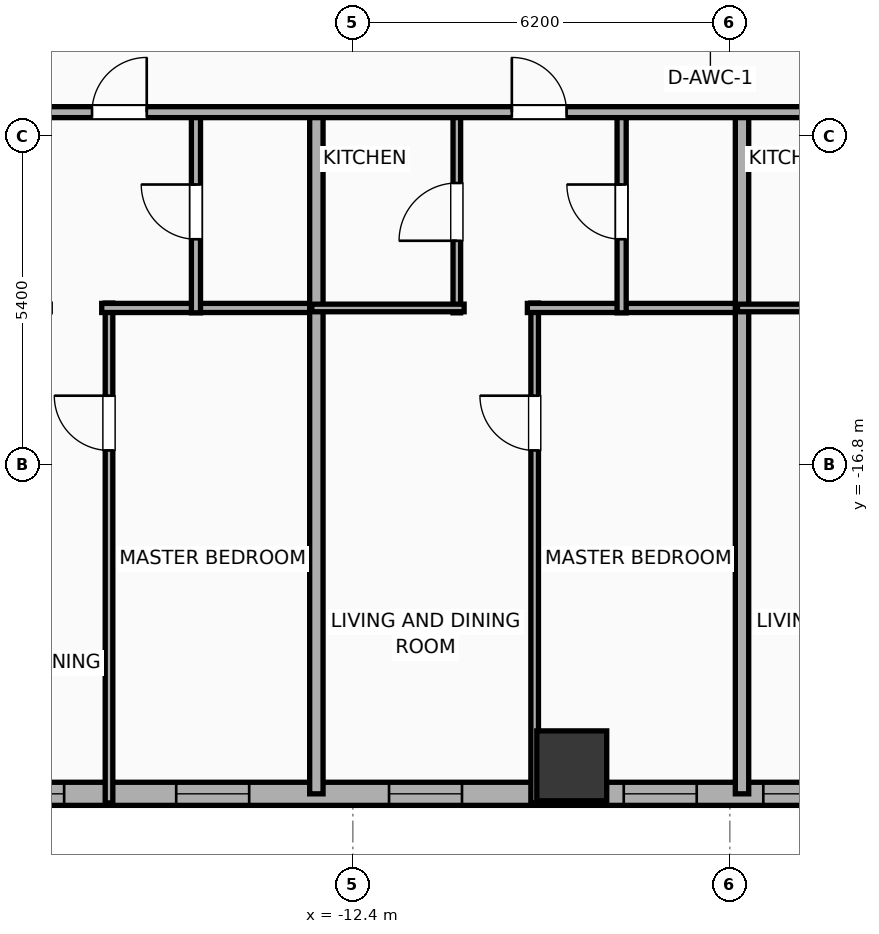
"""IFC4 building model, lengths in metres.
Left out: names, types, materials, properties, quantities, classifications, styles, units other than length and angle.
Written with IfcOpenShell. Run it as: python <this file> out.ifc"""

import sys

from ifc_helpers import new_model, si_unit, direction, frame, frame_2d, origin, origin_2d, place, context, subcontext, project, spatial, rectangle, hollow_rectangle, extrude, element, fill, save


model = new_model("IFC4")
c1 = context("Model", 3, precision=1e-05, world=origin(), true_north=direction((0.0, 1.0)))
c2 = subcontext(c1, "Body", "Model", "MODEL_VIEW")
j1 = project(units=[si_unit("LENGTHUNIT", "METRE"), si_unit("PLANEANGLEUNIT", "RADIAN")], contexts=[c1])
p1 = place(None, origin())
s1 = spatial("IfcSite", under=j1, at=p1, CompositionType="ELEMENT")
p2 = place(p1, origin())
s2 = spatial("IfcBuilding", under=s1, at=p2, CompositionType="ELEMENT")
p3 = place(p2, frame((0.0, 0.0, 65.0)))
s3 = spatial("IfcBuildingStorey", under=s2, at=p3, CompositionType="ELEMENT", Elevation=65.0)
p4 = place(p3, frame((-8.8, -21.75, 0.0), z_axis=(0.0, 0.0, 1.0), x_axis=(1.0, 0.0, 0.0)))
e1 = element("IfcColumn", 1, at=p4, inside=s3, PredefinedType="COLUMN", context=c2, shape_type="SweptSolid", body=[
    extrude(hollow_rectangle(XDim=1.15, YDim=1.15, WallThickness=0.04, at=origin_2d()), origin(), (0.0, 0.0, 1.0), 3.9),
])
p5 = place(p3, frame((22.381, -22.21, 0.0), z_axis=(0.0, 0.0, 1.0), x_axis=(-1.0, 0.0, 0.0)))
e2 = element("IfcWall", 2, at=p5, inside=s3, PredefinedType="ELEMENTEDWALL", context=c2, shape_type="SweptSolid", body=[
    extrude(rectangle(XDim=51.963, YDim=0.38, at=frame_2d((25.981, 0.0))), origin(), (0.0, 0.0, 1.0), 3.65),
])
p6 = place(p5, frame((25.631, 0.0, 0.75)))
e3 = element("IfcOpeningElement", 3, at=p6, cuts=e2, PredefinedType="OPENING", context=c2, shape_type="SweptSolid", body=[
    extrude(rectangle(XDim=2.4, YDim=2.1, at=frame_2d((1.2, 1.05))), frame((0.0, 0.2, 0.0), z_axis=(0.0, -1.0, 0.0), x_axis=(1.0, 0.0, 0.0)), (0.0, 0.0, 1.0), 0.4),
])
p7 = place(p5, frame((42.952, 0.0, 0.75)))
e4 = element("IfcOpeningElement", 4, at=p7, cuts=e2, PredefinedType="OPENING", context=c2, shape_type="SweptSolid", body=[
    extrude(rectangle(XDim=2.4, YDim=2.1, at=frame_2d((1.2, 1.05))), frame((0.0, 0.2, 0.0), z_axis=(0.0, -1.0, 0.0), x_axis=(1.0, 0.0, 0.0)), (0.0, 0.0, 1.0), 0.4),
])
p8 = place(p5, frame((49.433, 0.0, 0.75)))
e5 = element("IfcOpeningElement", 5, at=p8, cuts=e2, PredefinedType="OPENING", context=c2, shape_type="SweptSolid", body=[
    extrude(rectangle(XDim=1.2, YDim=2.05, at=frame_2d((0.6, 1.025))), frame((0.0, 0.2, 0.0), z_axis=(0.0, -1.0, 0.0), x_axis=(1.0, 0.0, 0.0)), (0.0, 0.0, 1.0), 0.4),
])
p9 = place(p5, frame((46.695, 0.0, 0.75)))
e6 = element("IfcOpeningElement", 6, at=p9, cuts=e2, PredefinedType="OPENING", context=c2, shape_type="SweptSolid", body=[
    extrude(rectangle(XDim=1.2, YDim=2.05, at=frame_2d((0.6, 1.025))), frame((0.0, 0.2, 0.0), z_axis=(0.0, -1.0, 0.0), x_axis=(1.0, 0.0, 0.0)), (0.0, 0.0, 1.0), 0.4),
])
p10 = place(p5, frame((39.529, 0.0, 0.75)))
e7 = element("IfcOpeningElement", 7, at=p10, cuts=e2, PredefinedType="OPENING", context=c2, shape_type="SweptSolid", body=[
    extrude(rectangle(XDim=1.2, YDim=2.05, at=frame_2d((0.6, 1.025))), frame((0.0, 0.2, 0.0), z_axis=(0.0, -1.0, 0.0), x_axis=(1.0, 0.0, 0.0)), (0.0, 0.0, 1.0), 0.4),
])
p11 = place(p5, frame((36.486, 0.0, 0.75)))
e8 = element("IfcOpeningElement", 8, at=p11, cuts=e2, PredefinedType="OPENING", context=c2, shape_type="SweptSolid", body=[
    extrude(rectangle(XDim=1.2, YDim=2.05, at=frame_2d((0.6, 1.025))), frame((0.0, 0.2, 0.0), z_axis=(0.0, -1.0, 0.0), x_axis=(1.0, 0.0, 0.0)), (0.0, 0.0, 1.0), 0.4),
])
p12 = place(p5, frame((32.986, 0.0, 0.75)))
e9 = element("IfcOpeningElement", 9, at=p12, cuts=e2, PredefinedType="OPENING", context=c2, shape_type="SweptSolid", body=[
    extrude(rectangle(XDim=1.2, YDim=2.05, at=frame_2d((0.6, 1.025))), frame((0.0, 0.2, 0.0), z_axis=(0.0, -1.0, 0.0), x_axis=(1.0, 0.0, 0.0)), (0.0, 0.0, 1.0), 0.4),
])
p13 = place(p5, frame((29.126, 0.0, 0.75)))
e10 = element("IfcOpeningElement", 10, at=p13, cuts=e2, PredefinedType="OPENING", context=c2, shape_type="SweptSolid", body=[
    extrude(rectangle(XDim=1.2, YDim=2.05, at=frame_2d((0.6, 1.025))), frame((0.0, 0.2, 0.0), z_axis=(0.0, -1.0, 0.0), x_axis=(1.0, 0.0, 0.0)), (0.0, 0.0, 1.0), 0.4),
])
p14 = place(p5, frame((22.486, 0.0, 0.75)))
e11 = element("IfcOpeningElement", 11, at=p14, cuts=e2, PredefinedType="OPENING", context=c2, shape_type="SweptSolid", body=[
    extrude(rectangle(XDim=1.2, YDim=2.05, at=frame_2d((0.6, 1.025))), frame((0.0, 0.2, 0.0), z_axis=(0.0, -1.0, 0.0), x_axis=(1.0, 0.0, 0.0)), (0.0, 0.0, 1.0), 0.4),
])
p15 = place(p5, frame((18.746, 0.0, 0.75)))
e12 = element("IfcOpeningElement", 12, at=p15, cuts=e2, PredefinedType="OPENING", context=c2, shape_type="SweptSolid", body=[
    extrude(rectangle(XDim=1.2, YDim=2.05, at=frame_2d((0.6, 1.025))), frame((0.0, 0.2, 0.0), z_axis=(0.0, -1.0, 0.0), x_axis=(1.0, 0.0, 0.0)), (0.0, 0.0, 1.0), 0.4),
])
p16 = place(p5, frame((15.486, 0.0, 0.75)))
e13 = element("IfcOpeningElement", 13, at=p16, cuts=e2, PredefinedType="OPENING", context=c2, shape_type="SweptSolid", body=[
    extrude(rectangle(XDim=1.2, YDim=2.05, at=frame_2d((0.6, 1.025))), frame((0.0, 0.2, 0.0), z_axis=(0.0, -1.0, 0.0), x_axis=(1.0, 0.0, 0.0)), (0.0, 0.0, 1.0), 0.4),
])
p17 = place(p5, frame((11.986, 0.0, 0.75)))
e14 = element("IfcOpeningElement", 14, at=p17, cuts=e2, PredefinedType="OPENING", context=c2, shape_type="SweptSolid", body=[
    extrude(rectangle(XDim=1.2, YDim=2.05, at=frame_2d((0.6, 1.025))), frame((0.0, 0.2, 0.0), z_axis=(0.0, -1.0, 0.0), x_axis=(1.0, 0.0, 0.0)), (0.0, 0.0, 1.0), 0.4),
])
p18 = place(p5, frame((8.366, 0.0, 0.75)))
e15 = element("IfcOpeningElement", 15, at=p18, cuts=e2, PredefinedType="OPENING", context=c2, shape_type="SweptSolid", body=[
    extrude(rectangle(XDim=1.2, YDim=2.05, at=frame_2d((0.6, 1.025))), frame((0.0, 0.2, 0.0), z_axis=(0.0, -1.0, 0.0), x_axis=(1.0, 0.0, 0.0)), (0.0, 0.0, 1.0), 0.4),
])
p19 = place(p5, frame((5.082, 0.0, 0.75)))
e16 = element("IfcOpeningElement", 16, at=p19, cuts=e2, PredefinedType="OPENING", context=c2, shape_type="SweptSolid", body=[
    extrude(rectangle(XDim=1.2, YDim=2.05, at=frame_2d((0.6, 1.025))), frame((0.0, 0.2, 0.0), z_axis=(0.0, -1.0, 0.0), x_axis=(1.0, 0.0, 0.0)), (0.0, 0.0, 1.0), 0.4),
])
p20 = place(p5, frame((2.277, 0.0, 0.75)))
e17 = element("IfcOpeningElement", 17, at=p20, cuts=e2, PredefinedType="OPENING", context=c2, shape_type="SweptSolid", body=[
    extrude(rectangle(XDim=1.2, YDim=2.05, at=frame_2d((0.6, 1.025))), frame((0.0, 0.2, 0.0), z_axis=(0.0, -1.0, 0.0), x_axis=(1.0, 0.0, 0.0)), (0.0, 0.0, 1.0), 0.4),
])
p21 = place(p5, frame((1.071, 0.0, 0.75)))
e18 = element("IfcOpeningElement", 18, at=p21, cuts=e2, PredefinedType="OPENING", context=c2, shape_type="SweptSolid", body=[
    extrude(rectangle(XDim=0.52, YDim=2.05, at=frame_2d((0.26, 1.025))), frame((0.0, 0.2, 0.0), z_axis=(0.0, -1.0, 0.0), x_axis=(1.0, 0.0, 0.0)), (0.0, 0.0, 1.0), 0.4),
])
p22 = place(p3, frame((-16.41, -22.36, 0.0), z_axis=(0.0, 0.0, 1.0), x_axis=(0.0, 1.0, 0.0)))
e19 = element("IfcWall", 19, at=p22, inside=s3, PredefinedType="PARTITIONING", context=c2, shape_type="SweptSolid", body=[
    extrude(rectangle(XDim=8.22, YDim=0.125, at=frame_2d((4.11, 0.0))), origin(), (0.0, 0.0, 1.0), 3.65),
])
p23 = place(p22, frame((5.797, 0.0, 0.0)))
e20 = element("IfcOpeningElement", 20, at=p23, cuts=e19, PredefinedType="OPENING", context=c2, shape_type="SweptSolid", body=[
    extrude(rectangle(XDim=0.9, YDim=2.05, at=frame_2d((0.45, 1.025))), frame((0.0, 0.073, 0.0), z_axis=(0.0, -1.0, 0.0), x_axis=(1.0, 0.0, 0.0)), (0.0, 0.0, 1.0), 0.145),
])
p24 = place(p3, frame((-16.53, -14.22, 0.0), z_axis=(0.0, 0.0, 1.0), x_axis=(1.0, 0.0, 0.0)))
e21 = element("IfcWall", 21, at=p24, inside=s3, PredefinedType="PLUMBINGWALL", context=c2, shape_type="SweptSolid", body=[
    extrude(rectangle(XDim=3.605, YDim=0.15, at=frame_2d((1.802, 0.0))), origin(), (0.0, 0.0, 1.0), 3.65),
])
p25 = place(p3, frame((-14.98, -14.3, 0.0), z_axis=(0.0, 0.0, 1.0), x_axis=(0.0, 1.0, 0.0)))
e22 = element("IfcWall", 22, at=p25, inside=s3, PredefinedType="PLUMBINGWALL", context=c2, shape_type="SweptSolid", body=[
    extrude(rectangle(XDim=3.32, YDim=0.15, at=frame_2d((1.66, 0.0))), origin(), (0.0, 0.0, 1.0), 3.65),
])
p26 = place(p25, frame((1.21, 0.0, 0.0)))
e23 = element("IfcOpeningElement", 23, at=p26, cuts=e22, PredefinedType="OPENING", context=c2, shape_type="SweptSolid", body=[
    extrude(rectangle(XDim=0.9, YDim=2.05, at=frame_2d((0.45, 1.025))), frame((0.0, 0.085, 0.0), z_axis=(0.0, -1.0, 0.0), x_axis=(1.0, 0.0, 0.0)), (0.0, 0.0, 1.0), 0.17),
])
p27 = place(p3, frame((-13.0, -22.21, 0.0), z_axis=(0.0, 0.0, 1.0), x_axis=(0.0, 1.0, 0.0)))
e24 = element("IfcWall", 24, at=p27, inside=s3, PredefinedType="PARTITIONING", context=c2, shape_type="SweptSolid", body=[
    extrude(rectangle(XDim=11.29, YDim=0.22, at=frame_2d((5.645, 0.0))), origin(), (0.0, 0.0, 1.0), 3.65),
])
p28 = place(p3, frame((-9.41, -22.36, 0.0), z_axis=(0.0, 0.0, 1.0), x_axis=(0.0, 1.0, 0.0)))
e25 = element("IfcWall", 25, at=p28, inside=s3, PredefinedType="PARTITIONING", context=c2, shape_type="SweptSolid", body=[
    extrude(rectangle(XDim=8.22, YDim=0.125, at=frame_2d((4.11, 0.0))), origin(), (0.0, 0.0, 1.0), 2.94),
])
p29 = place(p28, frame((5.797, 0.0, 0.0)))
e26 = element("IfcOpeningElement", 26, at=p29, cuts=e25, PredefinedType="OPENING", context=c2, shape_type="SweptSolid", body=[
    extrude(rectangle(XDim=0.9, YDim=2.05, at=frame_2d((0.45, 1.025))), frame((0.0, 0.073, 0.0), z_axis=(0.0, -1.0, 0.0), x_axis=(1.0, 0.0, 0.0)), (0.0, 0.0, 1.0), 0.145),
])
p30 = place(p3, frame((-9.53, -14.22, 0.0), z_axis=(0.0, 0.0, 1.0), x_axis=(1.0, 0.0, 0.0)))
e27 = element("IfcWall", 27, at=p30, inside=s3, PredefinedType="PLUMBINGWALL", context=c2, shape_type="SweptSolid", body=[
    extrude(rectangle(XDim=3.605, YDim=0.15, at=frame_2d((1.802, 0.0))), origin(), (0.0, 0.0, 1.0), 3.65),
])
p31 = place(p3, frame((-10.69, -14.3, 0.0), z_axis=(0.0, 0.0, 1.0), x_axis=(0.0, 1.0, 0.0)))
e28 = element("IfcWall", 28, at=p31, inside=s3, PredefinedType="PARTITIONING", context=c2, shape_type="SweptSolid", body=[
    extrude(rectangle(XDim=3.32, YDim=0.125, at=frame_2d((1.66, 0.0))), origin(), (0.0, 0.0, 1.0), 2.94),
])
p32 = place(p31, frame((1.185, 0.0, 0.0)))
e29 = element("IfcOpeningElement", 29, at=p32, cuts=e28, PredefinedType="OPENING", context=c2, shape_type="SweptSolid", body=[
    extrude(rectangle(XDim=0.95, YDim=2.05, at=frame_2d((0.475, 1.025))), frame((0.0, 0.073, 0.0), z_axis=(0.0, -1.0, 0.0), x_axis=(1.0, 0.0, 0.0)), (0.0, 0.0, 1.0), 0.145),
])
p33 = place(p3, frame((-13.075, -14.22, 0.0), z_axis=(0.0, 0.0, 1.0), x_axis=(1.0, 0.0, 0.0)))
e30 = element("IfcWall", 30, at=p33, inside=s3, PredefinedType="PARTITIONING", context=c2, shape_type="SweptSolid", body=[
    extrude(rectangle(XDim=2.505, YDim=0.125, at=frame_2d((1.252, 0.0))), origin(), (0.0, 0.0, 1.0), 3.65),
])
p34 = place(p3, frame((-7.98, -14.3, 0.0), z_axis=(0.0, 0.0, 1.0), x_axis=(0.0, 1.0, 0.0)))
e31 = element("IfcWall", 31, at=p34, inside=s3, PredefinedType="PLUMBINGWALL", context=c2, shape_type="SweptSolid", body=[
    extrude(rectangle(XDim=3.32, YDim=0.15, at=frame_2d((1.66, 0.0))), origin(), (0.0, 0.0, 1.0), 3.65),
])
p35 = place(p34, frame((1.21, 0.0, 0.0)))
e32 = element("IfcOpeningElement", 32, at=p35, cuts=e31, PredefinedType="OPENING", context=c2, shape_type="SweptSolid", body=[
    extrude(rectangle(XDim=0.9, YDim=2.05, at=frame_2d((0.45, 1.025))), frame((0.0, 0.085, 0.0), z_axis=(0.0, -1.0, 0.0), x_axis=(1.0, 0.0, 0.0)), (0.0, 0.0, 1.0), 0.17),
])
p36 = place(p3, frame((-6.0, -22.21, 0.0), z_axis=(0.0, 0.0, 1.0), x_axis=(0.0, 1.0, 0.0)))
e33 = element("IfcWall", 33, at=p36, inside=s3, PredefinedType="PARTITIONING", context=c2, shape_type="SweptSolid", body=[
    extrude(rectangle(XDim=11.29, YDim=0.22, at=frame_2d((5.645, 0.0))), origin(), (0.0, 0.0, 1.0), 3.65),
])
p37 = place(p3, frame((-6.075, -14.22, 0.0), z_axis=(0.0, 0.0, 1.0), x_axis=(1.0, 0.0, 0.0)))
e34 = element("IfcWall", 34, at=p37, inside=s3, PredefinedType="PARTITIONING", context=c2, shape_type="SweptSolid", body=[
    extrude(rectangle(XDim=2.505, YDim=0.125, at=frame_2d((1.252, 0.0))), origin(), (0.0, 0.0, 1.0), 3.65),
])
p38 = place(p3, frame((-33.41, -11.0, 0.0), z_axis=(0.0, 0.0, 1.0), x_axis=(1.0, 0.0, 0.0)))
e35 = element("IfcWall", 35, at=p38, inside=s3, PredefinedType="PARTITIONING", context=c2, shape_type="SweptSolid", body=[
    extrude(rectangle(XDim=59.62, YDim=0.18, at=frame_2d((29.81, 0.0))), origin(), (0.0, 0.0, 1.0), 3.65),
])
p39 = place(p38, frame((3.08, 0.0, 0.0)))
e36 = element("IfcOpeningElement", 36, at=p39, cuts=e35, PredefinedType="OPENING", context=c2, shape_type="SweptSolid", body=[
    extrude(rectangle(XDim=0.9, YDim=2.05, at=frame_2d((0.45, 1.025))), frame((0.0, 0.1, 0.0), z_axis=(0.0, -1.0, 0.0), x_axis=(1.0, 0.0, 0.0)), (0.0, 0.0, 1.0), 0.2),
])
p40 = place(p38, frame((9.918, 0.0, 0.0)))
e37 = element("IfcOpeningElement", 37, at=p40, cuts=e35, PredefinedType="OPENING", context=c2, shape_type="SweptSolid", body=[
    extrude(rectangle(XDim=0.9, YDim=2.05, at=frame_2d((0.45, 1.025))), frame((0.0, 0.1, 0.0), z_axis=(0.0, -1.0, 0.0), x_axis=(1.0, 0.0, 0.0)), (0.0, 0.0, 1.0), 0.2),
])
p41 = place(p38, frame((16.721, 0.0, 0.0)))
e38 = element("IfcOpeningElement", 38, at=p41, cuts=e35, PredefinedType="OPENING", context=c2, shape_type="SweptSolid", body=[
    extrude(rectangle(XDim=0.9, YDim=2.05, at=frame_2d((0.45, 1.025))), frame((0.0, 0.1, 0.0), z_axis=(0.0, -1.0, 0.0), x_axis=(1.0, 0.0, 0.0)), (0.0, 0.0, 1.0), 0.2),
])
p42 = place(p38, frame((23.625, 0.0, 0.0)))
e39 = element("IfcOpeningElement", 39, at=p42, cuts=e35, PredefinedType="OPENING", context=c2, shape_type="SweptSolid", body=[
    extrude(rectangle(XDim=0.9, YDim=2.05, at=frame_2d((0.45, 1.025))), frame((0.0, 0.1, 0.0), z_axis=(0.0, -1.0, 0.0), x_axis=(1.0, 0.0, 0.0)), (0.0, 0.0, 1.0), 0.2),
])
p43 = place(p38, frame((30.624, 0.0, 0.0)))
e40 = element("IfcOpeningElement", 40, at=p43, cuts=e35, PredefinedType="OPENING", context=c2, shape_type="SweptSolid", body=[
    extrude(rectangle(XDim=0.9, YDim=2.05, at=frame_2d((0.45, 1.025))), frame((0.0, 0.1, 0.0), z_axis=(0.0, -1.0, 0.0), x_axis=(1.0, 0.0, 0.0)), (0.0, 0.0, 1.0), 0.2),
])
p44 = place(p38, frame((37.623, 0.0, 0.0)))
e41 = element("IfcOpeningElement", 41, at=p44, cuts=e35, PredefinedType="OPENING", context=c2, shape_type="SweptSolid", body=[
    extrude(rectangle(XDim=0.9, YDim=2.05, at=frame_2d((0.45, 1.025))), frame((0.0, 0.1, 0.0), z_axis=(0.0, -1.0, 0.0), x_axis=(1.0, 0.0, 0.0)), (0.0, 0.0, 1.0), 0.2),
])
p45 = place(p38, frame((44.623, 0.0, 0.0)))
e42 = element("IfcOpeningElement", 42, at=p45, cuts=e35, PredefinedType="OPENING", context=c2, shape_type="SweptSolid", body=[
    extrude(rectangle(XDim=0.9, YDim=2.05, at=frame_2d((0.45, 1.025))), frame((0.0, 0.1, 0.0), z_axis=(0.0, -1.0, 0.0), x_axis=(1.0, 0.0, 0.0)), (0.0, 0.0, 1.0), 0.2),
])
p46 = place(p38, frame((49.565, 0.0, 0.0)))
e43 = element("IfcOpeningElement", 43, at=p46, cuts=e35, PredefinedType="OPENING", context=c2, shape_type="SweptSolid", body=[
    extrude(rectangle(XDim=1.15, YDim=2.05, at=frame_2d((0.575, 1.025))), frame((0.0, 0.1, 0.0), z_axis=(0.0, -1.0, 0.0), x_axis=(1.0, 0.0, 0.0)), (0.0, 0.0, 1.0), 0.2),
])
p47 = place(p38, frame((56.583, 0.0, 0.0)))
e44 = element("IfcOpeningElement", 44, at=p47, cuts=e35, PredefinedType="OPENING", context=c2, shape_type="SweptSolid", body=[
    extrude(rectangle(XDim=0.9, YDim=2.05, at=frame_2d((0.45, 1.025))), frame((0.0, 0.1, 0.0), z_axis=(0.0, -1.0, 0.0), x_axis=(1.0, 0.0, 0.0)), (0.0, 0.0, 1.0), 0.2),
])
p48 = place(p6, origin())
e45 = element("IfcWindow", 45, at=p48, inside=s3, PartitioningType="SINGLE_PANEL", PredefinedType="WINDOW", context=c2, shape_type="SweptSolid", body=[
    extrude(rectangle(XDim=2.4, YDim=2.1, at=frame_2d((1.2, 1.05))), frame((0.0, 0.03, 0.0), z_axis=(0.0, -1.0, 0.0), x_axis=(1.0, 0.0, 0.0)), (0.0, 0.0, 1.0), 0.06),
])
fill(e3, e45)
p49 = place(p10, origin())
e46 = element("IfcWindow", 46, at=p49, inside=s3, PartitioningType="SINGLE_PANEL", PredefinedType="WINDOW", context=c2, shape_type="SweptSolid", body=[
    extrude(rectangle(XDim=1.2, YDim=2.05, at=frame_2d((0.6, 1.025))), frame((0.0, 0.03, 0.0), z_axis=(0.0, -1.0, 0.0), x_axis=(1.0, 0.0, 0.0)), (0.0, 0.0, 1.0), 0.06),
])
fill(e7, e46)
p50 = place(p11, origin())
e47 = element("IfcWindow", 47, at=p50, inside=s3, PartitioningType="SINGLE_PANEL", PredefinedType="WINDOW", context=c2, shape_type="SweptSolid", body=[
    extrude(rectangle(XDim=1.2, YDim=2.05, at=frame_2d((0.6, 1.025))), frame((0.0, 0.03, 0.0), z_axis=(0.0, -1.0, 0.0), x_axis=(1.0, 0.0, 0.0)), (0.0, 0.0, 1.0), 0.06),
])
fill(e8, e47)
p51 = place(p12, origin())
e48 = element("IfcWindow", 48, at=p51, inside=s3, PartitioningType="SINGLE_PANEL", PredefinedType="WINDOW", context=c2, shape_type="SweptSolid", body=[
    extrude(rectangle(XDim=1.2, YDim=2.05, at=frame_2d((0.6, 1.025))), frame((0.0, 0.03, 0.0), z_axis=(0.0, -1.0, 0.0), x_axis=(1.0, 0.0, 0.0)), (0.0, 0.0, 1.0), 0.06),
])
fill(e9, e48)
p52 = place(p13, origin())
e49 = element("IfcWindow", 49, at=p52, inside=s3, PartitioningType="SINGLE_PANEL", PredefinedType="WINDOW", context=c2, shape_type="SweptSolid", body=[
    extrude(rectangle(XDim=1.2, YDim=2.05, at=frame_2d((0.6, 1.025))), frame((0.0, 0.03, 0.0), z_axis=(0.0, -1.0, 0.0), x_axis=(1.0, 0.0, 0.0)), (0.0, 0.0, 1.0), 0.06),
])
fill(e10, e49)
p53 = place(p23, origin())
e50 = element("IfcDoor", 50, at=p53, inside=s3, OperationType="SINGLE_SWING_RIGHT", PredefinedType="DOOR", context=c2, shape_type="SweptSolid", body=[
    extrude(rectangle(XDim=0.9, YDim=2.05, at=frame_2d((0.45, 1.025))), frame((0.0, 0.025, 0.0), z_axis=(0.0, -1.0, 0.0), x_axis=(1.0, 0.0, 0.0)), (0.0, 0.0, 1.0), 0.05),
])
fill(e20, e50)
p54 = place(p26, origin())
e51 = element("IfcDoor", 51, at=p54, inside=s3, OperationType="SINGLE_SWING_RIGHT", PredefinedType="DOOR", context=c2, shape_type="SweptSolid", body=[
    extrude(rectangle(XDim=0.9, YDim=2.05, at=frame_2d((0.45, 1.025))), frame((0.0, 0.025, 0.0), z_axis=(0.0, -1.0, 0.0), x_axis=(1.0, 0.0, 0.0)), (0.0, 0.0, 1.0), 0.05),
])
fill(e23, e51)
p55 = place(p29, origin())
e52 = element("IfcDoor", 52, at=p55, inside=s3, OperationType="SINGLE_SWING_RIGHT", PredefinedType="DOOR", context=c2, shape_type="SweptSolid", body=[
    extrude(rectangle(XDim=0.9, YDim=2.05, at=frame_2d((0.45, 1.025))), frame((0.0, 0.025, 0.0), z_axis=(0.0, -1.0, 0.0), x_axis=(1.0, 0.0, 0.0)), (0.0, 0.0, 1.0), 0.05),
])
fill(e26, e52)
p56 = place(p32, origin())
e53 = element("IfcDoor", 53, at=p56, inside=s3, OperationType="SINGLE_SWING_LEFT", PredefinedType="DOOR", context=c2, shape_type="SweptSolid", body=[
    extrude(rectangle(XDim=0.95, YDim=2.05, at=frame_2d((0.475, 1.025))), frame((0.0, 0.025, 0.0), z_axis=(0.0, -1.0, 0.0), x_axis=(1.0, 0.0, 0.0)), (0.0, 0.0, 1.0), 0.05),
])
fill(e29, e53)
p57 = place(p35, origin())
e54 = element("IfcDoor", 54, at=p57, inside=s3, OperationType="SINGLE_SWING_RIGHT", PredefinedType="DOOR", context=c2, shape_type="SweptSolid", body=[
    extrude(rectangle(XDim=0.9, YDim=2.05, at=frame_2d((0.45, 1.025))), frame((0.0, 0.025, 0.0), z_axis=(0.0, -1.0, 0.0), x_axis=(1.0, 0.0, 0.0)), (0.0, 0.0, 1.0), 0.05),
])
fill(e32, e54)
p58 = place(p41, origin())
e55 = element("IfcDoor", 55, at=p58, inside=s3, OperationType="SINGLE_SWING_RIGHT", PredefinedType="DOOR", context=c2, shape_type="SweptSolid", body=[
    extrude(rectangle(XDim=0.9, YDim=2.05, at=frame_2d((0.45, 1.025))), frame((0.0, 0.025, 0.0), z_axis=(0.0, -1.0, 0.0), x_axis=(1.0, 0.0, 0.0)), (0.0, 0.0, 1.0), 0.05),
])
fill(e38, e55)
p59 = place(p42, origin())
e56 = element("IfcDoor", 56, at=p59, inside=s3, OperationType="SINGLE_SWING_LEFT", PredefinedType="DOOR", context=c2, shape_type="SweptSolid", body=[
    extrude(rectangle(XDim=0.9, YDim=2.05, at=frame_2d((0.45, 1.025))), frame((0.0, 0.025, 0.0), z_axis=(0.0, -1.0, 0.0), x_axis=(1.0, 0.0, 0.0)), (0.0, 0.0, 1.0), 0.05),
])
fill(e39, e56)
save(model, sys.argv[1])
